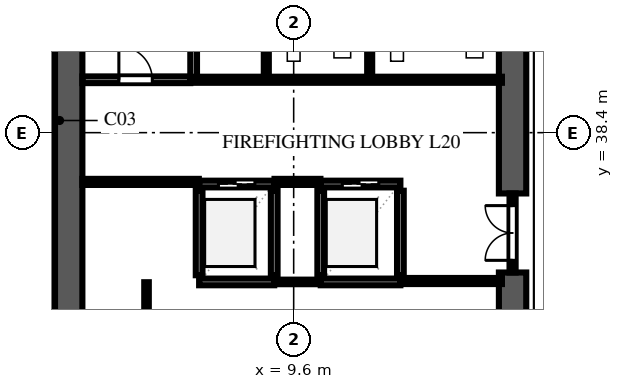
"""IFC4 building model, lengths in metres.
Left out: names, types, materials, properties, quantities, classifications, styles, units other than length and angle.
Written with IfcOpenShell. Run it as: python <this file> out.ifc"""

import sys

from ifc_helpers import new_model, si_unit, direction, frame, frame_2d, origin, place, context, subcontext, project, spatial, rectangle, extrude, element, fill, save


model = new_model("IFC4")
c1 = context("Model", 3, precision=1e-05, world=origin(), true_north=direction((0.0, 1.0)))
c2 = subcontext(c1, "Body", "Model", "MODEL_VIEW")
j1 = project(units=[si_unit("LENGTHUNIT", "METRE"), si_unit("PLANEANGLEUNIT", "RADIAN")], contexts=[c1])
p1 = place(None, origin())
s1 = spatial("IfcSite", under=j1, at=p1, CompositionType="ELEMENT")
p2 = place(p1, origin())
s2 = spatial("IfcBuilding", under=s1, at=p2, CompositionType="ELEMENT")
p3 = place(p2, frame((0.0, 0.0, 81.2)))
s3 = spatial("IfcBuildingStorey", under=s2, at=p3, CompositionType="ELEMENT", Elevation=81.2)
p4 = place(p3, frame((2.2, 9.15, 0.0), z_axis=(0.0, 0.0, 1.0), x_axis=(0.0, 1.0, 0.0)))
e1 = element("IfcWall", 1, at=p4, inside=s3, PredefinedType="SHEAR", context=c2, shape_type="SweptSolid", body=[
    extrude(rectangle(XDim=39.3, YDim=0.9, at=frame_2d((19.65, 0.0))), origin(), (0.0, 0.0, 1.0), 3.54),
])
p5 = place(p3, frame((16.8, 26.0, 0.0), z_axis=(0.0, 0.0, 1.0), x_axis=(0.0, 1.0, 0.0)))
e2 = element("IfcWall", 2, at=p5, inside=s3, PredefinedType="SHEAR", context=c2, shape_type="SweptSolid", body=[
    extrude(rectangle(XDim=7.8, YDim=0.9, at=frame_2d((3.9, 0.0))), origin(), (0.0, 0.0, 1.0), 3.54),
])
p6 = place(p3, frame((16.8, 36.4, 0.0), z_axis=(0.0, 0.0, 1.0), x_axis=(0.0, 1.0, 0.0)))
e3 = element("IfcWall", 3, at=p6, inside=s3, PredefinedType="SHEAR", context=c2, shape_type="SweptSolid", body=[
    extrude(rectangle(XDim=11.15, YDim=0.9, at=frame_2d((5.575, 0.0))), origin(), (0.0, 0.0, 1.0), 3.54),
])
p7 = place(p6, frame((9.2, 0.0, 0.0)))
e4 = element("IfcOpeningElement", 4, at=p7, cuts=e3, PredefinedType="OPENING", context=c2, shape_type="SweptSolid", body=[
    extrude(rectangle(XDim=0.95, YDim=2.15, at=frame_2d((0.475, 1.075))), frame((0.0, 0.462, 0.0), z_axis=(0.0, -1.0, 0.0), x_axis=(1.0, 0.0, 0.0)), (0.0, 0.0, 1.0), 0.924),
])
p8 = place(p3, frame((2.65, 40.14, 0.0), z_axis=(0.0, 0.0, 1.0), x_axis=(1.0, 0.0, 0.0)))
e5 = element("IfcWall", 5, at=p8, inside=s3, PredefinedType="SOLIDWALL", context=c2, shape_type="SweptSolid", body=[
    extrude(rectangle(XDim=3.55, YDim=0.22, at=frame_2d((1.775, 0.0))), origin(), (0.0, 0.0, 1.0), 3.54),
])
p9 = place(p8, frame((1.2, 0.0, 0.0)))
e6 = element("IfcOpeningElement", 6, at=p9, cuts=e5, PredefinedType="OPENING", context=c2, shape_type="SweptSolid", body=[
    extrude(rectangle(XDim=1.1, YDim=2.2, at=frame_2d((0.55, 1.1))), frame((0.0, 0.122, 0.0), z_axis=(0.0, -1.0, 0.0), x_axis=(1.0, 0.0, 0.0)), (0.0, 0.0, 1.0), 0.244),
])
p10 = place(p3, frame((6.31, 40.14, 0.0), z_axis=(0.0, 0.0, 1.0), x_axis=(0.0, 1.0, 0.0)))
e7 = element("IfcWall", 7, at=p10, inside=s3, PredefinedType="SOLIDWALL", context=c2, shape_type="SweptSolid", body=[
    extrude(rectangle(XDim=7.81, YDim=0.22, at=frame_2d((3.905, 0.0))), origin(), (0.0, 0.0, 1.0), 3.54),
])
for number, where, z_axis, x_axis in (
    (8, (6.49, 33.71, 0.0), (0.0, 0.0, 1.0), (0.0, 1.0, 0.0)),
    (9, (8.96, 33.71, 0.0), (0.0, 0.0, 1.0), (0.0, 1.0, 0.0)),
):
    element("IfcWall", number, at=place(p3, frame(where, z_axis=z_axis, x_axis=x_axis)), inside=s3, PredefinedType="SOLIDWALL", context=c2, shape_type="SweptSolid", body=[
        extrude(rectangle(XDim=2.78, YDim=0.22, at=frame_2d((1.39, 0.0))), origin(), (0.0, 0.0, 1.0), 3.54),
    ])
p11 = place(p3, frame((6.49, 33.49, 0.0), z_axis=(0.0, 0.0, 1.0), x_axis=(1.0, 0.0, 0.0)))
e10 = element("IfcWall", 10, at=p11, inside=s3, PredefinedType="SOLIDWALL", context=c2, shape_type="SweptSolid", body=[
    extrude(rectangle(XDim=2.47, YDim=0.22, at=frame_2d((1.235, 0.0))), origin(), (0.0, 0.0, 1.0), 3.54),
])
p12 = place(p3, frame((6.49, 36.71, 0.0), z_axis=(0.0, 0.0, 1.0), x_axis=(1.0, 0.0, 0.0)))
e11 = element("IfcWall", 11, at=p12, inside=s3, PredefinedType="SOLIDWALL", context=c2, shape_type="SweptSolid", body=[
    extrude(rectangle(XDim=2.47, YDim=0.22, at=frame_2d((1.235, 0.0))), origin(), (0.0, 0.0, 1.0), 3.54),
])
p13 = place(p12, frame((0.635, 0.0, 0.0)))
e12 = element("IfcOpeningElement", 12, at=p13, cuts=e11, PredefinedType="OPENING", context=c2, shape_type="SweptSolid", body=[
    extrude(rectangle(XDim=1.2, YDim=2.2, at=frame_2d((0.6, 1.1))), frame((0.0, 0.122, 0.0), z_axis=(0.0, -1.0, 0.0), x_axis=(1.0, 0.0, 0.0)), (0.0, 0.0, 1.0), 0.244),
])
for number, where, z_axis, x_axis in (
    (13, (10.49, 33.71, 0.0), (0.0, 0.0, 1.0), (0.0, 1.0, 0.0)),
    (14, (13.11, 33.71, 0.0), (0.0, 0.0, 1.0), (0.0, 1.0, 0.0)),
):
    element("IfcWall", number, at=place(p3, frame(where, z_axis=z_axis, x_axis=x_axis)), inside=s3, PredefinedType="SOLIDWALL", context=c2, shape_type="SweptSolid", body=[
        extrude(rectangle(XDim=2.78, YDim=0.22, at=frame_2d((1.39, 0.0))), origin(), (0.0, 0.0, 1.0), 3.54),
    ])
p14 = place(p3, frame((10.49, 33.49, 0.0), z_axis=(0.0, 0.0, 1.0), x_axis=(1.0, 0.0, 0.0)))
e15 = element("IfcWall", 15, at=p14, inside=s3, PredefinedType="SOLIDWALL", context=c2, shape_type="SweptSolid", body=[
    extrude(rectangle(XDim=2.62, YDim=0.22, at=frame_2d((1.31, 0.0))), origin(), (0.0, 0.0, 1.0), 3.54),
])
p15 = place(p3, frame((10.49, 36.71, 0.0), z_axis=(0.0, 0.0, 1.0), x_axis=(1.0, 0.0, 0.0)))
e16 = element("IfcWall", 16, at=p15, inside=s3, PredefinedType="SOLIDWALL", context=c2, shape_type="SweptSolid", body=[
    extrude(rectangle(XDim=2.62, YDim=0.22, at=frame_2d((1.31, 0.0))), origin(), (0.0, 0.0, 1.0), 3.54),
])
p16 = place(p15, frame((0.71, 0.0, 0.0)))
e17 = element("IfcOpeningElement", 17, at=p16, cuts=e16, PredefinedType="OPENING", context=c2, shape_type="SweptSolid", body=[
    extrude(rectangle(XDim=1.2, YDim=2.2, at=frame_2d((0.6, 1.1))), frame((0.0, 0.122, 0.0), z_axis=(0.0, -1.0, 0.0), x_axis=(1.0, 0.0, 0.0)), (0.0, 0.0, 1.0), 0.244),
])
p17 = place(p3, frame((2.65, 36.78, 0.0), z_axis=(0.0, 0.0, 1.0), x_axis=(1.0, 0.0, 0.0)))
e18 = element("IfcWall", 18, at=p17, inside=s3, PredefinedType="SOLIDWALL", context=c2, shape_type="SweptSolid", body=[
    extrude(rectangle(XDim=3.83, YDim=0.2, at=frame_2d((1.915, 0.0))), origin(), (0.0, 0.0, 1.0), 3.54),
])
p18 = place(p3, frame((8.97, 36.78, 0.0), z_axis=(0.0, 0.0, 1.0), x_axis=(1.0, 0.0, 0.0)))
e19 = element("IfcWall", 19, at=p18, inside=s3, PredefinedType="SOLIDWALL", context=c2, shape_type="SweptSolid", body=[
    extrude(rectangle(XDim=1.51, YDim=0.2, at=frame_2d((0.755, 0.0))), origin(), (0.0, 0.0, 1.0), 3.54),
])
p19 = place(p3, frame((13.12, 33.52, 0.0), z_axis=(0.0, 0.0, 1.0), x_axis=(1.0, 0.0, 0.0)))
e20 = element("IfcWall", 20, at=p19, inside=s3, PredefinedType="SOLIDWALL", context=c2, shape_type="SweptSolid", body=[
    extrude(rectangle(XDim=3.33, YDim=0.2, at=frame_2d((1.665, 0.0))), origin(), (0.0, 0.0, 1.0), 3.54),
])
p20 = place(p3, frame((6.32, 40.14, 0.0), z_axis=(0.0, 0.0, 1.0), x_axis=(1.0, 0.0, 0.0)))
e21 = element("IfcWall", 21, at=p20, inside=s3, PredefinedType="SOLIDWALL", context=c2, shape_type="SweptSolid", body=[
    extrude(rectangle(XDim=10.13, YDim=0.2, at=frame_2d((5.065, 0.0))), origin(), (0.0, 0.0, 1.0), 3.54),
])
p21 = place(p3, frame((16.8, 33.8, 0.0), z_axis=(0.0, 0.0, 1.0), x_axis=(0.0, 1.0, 0.0)))
e22 = element("IfcWall", 22, at=p21, inside=s3, PredefinedType="SOLIDWALL", context=c2, shape_type="SweptSolid", body=[
    extrude(rectangle(XDim=2.6, YDim=0.2, at=frame_2d((1.3, 0.0))), origin(), (0.0, 0.0, 1.0), 3.54),
])
p22 = place(p21, frame((0.4, 0.0, 0.0)))
e23 = element("IfcOpeningElement", 23, at=p22, cuts=e22, PredefinedType="OPENING", context=c2, shape_type="SweptSolid", body=[
    extrude(rectangle(XDim=1.8, YDim=2.2, at=frame_2d((0.9, 1.1))), frame((0.0, 0.112, 0.0), z_axis=(0.0, -1.0, 0.0), x_axis=(1.0, 0.0, 0.0)), (0.0, 0.0, 1.0), 0.224),
])
p23 = place(p3, frame((8.965, 33.49, 0.0), z_axis=(0.0, 0.0, 1.0), x_axis=(1.0, 0.0, 0.0)))
e24 = element("IfcWall", 24, at=p23, inside=s3, PredefinedType="PARTITIONING", context=c2, shape_type="SweptSolid", body=[
    extrude(rectangle(XDim=1.52, YDim=0.15, at=frame_2d((0.76, 0.0))), origin(), (0.0, 0.0, 1.0), 3.54),
])
p24 = place(p3, frame((4.76, 30.55, 0.0), z_axis=(0.0, 0.0, 1.0), x_axis=(0.0, 1.0, 0.0)))
e25 = element("IfcWall", 25, at=p24, inside=s3, PredefinedType="PARTITIONING", context=c2, shape_type="SweptSolid", body=[
    extrude(rectangle(XDim=2.93, YDim=0.15, at=frame_2d((1.465, 0.0))), origin(), (0.0, 0.0, 1.0), 3.54),
])
p25 = place(p24, frame((0.6, 0.0, 0.0)))
e26 = element("IfcOpeningElement", 26, at=p25, cuts=e25, PredefinedType="OPENING", context=c2, shape_type="SweptSolid", body=[
    extrude(rectangle(XDim=0.85, YDim=2.1, at=frame_2d((0.425, 1.05))), frame((0.0, 0.087, 0.0), z_axis=(0.0, -1.0, 0.0), x_axis=(1.0, 0.0, 0.0)), (0.0, 0.0, 1.0), 0.174),
])
for number, where, z_axis, x_axis in (
    (27, (8.7, 40.4, 0.0), (0.0, 0.0, 1.0), (0.0, 1.0, 0.0)),
    (28, (12.1, 40.4, 0.0), (0.0, 0.0, 1.0), (0.0, 1.0, 0.0)),
):
    element("IfcWall", number, at=place(p3, frame(where, z_axis=z_axis, x_axis=x_axis)), inside=s3, PredefinedType="PLUMBINGWALL", context=c2, shape_type="SweptSolid", body=[
        extrude(rectangle(XDim=4.92, YDim=0.165, at=frame_2d((2.46, 0.0))), origin(), (0.0, 0.0, 1.0), 3.54),
    ])
p26 = place(p9, origin())
e29 = element("IfcDoor", 29, at=p26, inside=s3, OperationType="SINGLE_SWING_LEFT", PredefinedType="DOOR", context=c2, shape_type="SweptSolid", body=[
    extrude(rectangle(XDim=1.1, YDim=2.2, at=frame_2d((0.55, 1.1))), frame((0.0, 0.025, 0.0), z_axis=(0.0, -1.0, 0.0), x_axis=(1.0, 0.0, 0.0)), (0.0, 0.0, 1.0), 0.05),
])
fill(e6, e29)
p27 = place(p13, origin())
e30 = element("IfcDoor", 30, at=p27, inside=s3, OperationType="DOUBLE_DOOR_SLIDING", PredefinedType="DOOR", context=c2, shape_type="SweptSolid", body=[
    extrude(rectangle(XDim=1.2, YDim=2.2, at=frame_2d((0.6, 1.1))), frame((0.0, 0.025, 0.0), z_axis=(0.0, -1.0, 0.0), x_axis=(1.0, 0.0, 0.0)), (0.0, 0.0, 1.0), 0.05),
])
fill(e12, e30)
p28 = place(p16, origin())
e31 = element("IfcDoor", 31, at=p28, inside=s3, OperationType="DOUBLE_DOOR_SLIDING", PredefinedType="DOOR", context=c2, shape_type="SweptSolid", body=[
    extrude(rectangle(XDim=1.2, YDim=2.2, at=frame_2d((0.6, 1.1))), frame((0.0, 0.025, 0.0), z_axis=(0.0, -1.0, 0.0), x_axis=(1.0, 0.0, 0.0)), (0.0, 0.0, 1.0), 0.05),
])
fill(e17, e31)
p29 = place(p22, origin())
e32 = element("IfcDoor", 32, at=p29, inside=s3, OperationType="DOUBLE_DOOR_SINGLE_SWING", PredefinedType="DOOR", context=c2, shape_type="SweptSolid", body=[
    extrude(rectangle(XDim=1.8, YDim=2.2, at=frame_2d((0.9, 1.1))), frame((0.0, 0.025, 0.0), z_axis=(0.0, -1.0, 0.0), x_axis=(1.0, 0.0, 0.0)), (0.0, 0.0, 1.0), 0.05),
])
fill(e23, e32)
save(model, sys.argv[1])
